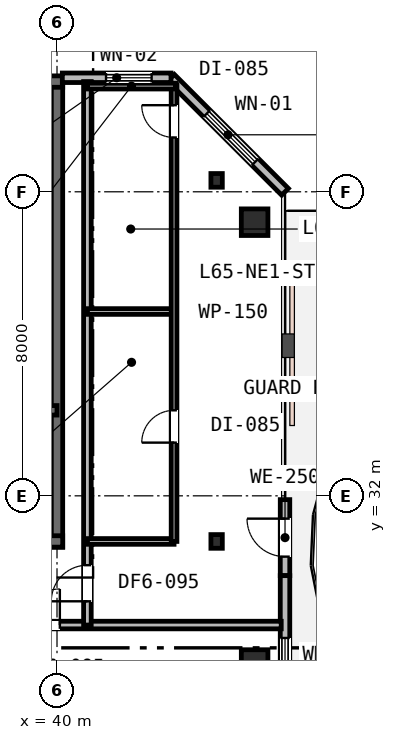
"""IFC4 building model, lengths in metres.
Left out: names, types, materials, properties, quantities, classifications, styles, units other than length and angle.
Written with IfcOpenShell. Run it as: python <this file> out.ifc"""

import sys

from ifc_helpers import new_model, si_unit, direction, frame, frame_2d, origin, origin_2d, place, context, subcontext, project, spatial, rectangle, i_section, extrude, element, fill, save


model = new_model("IFC4")
c1 = context("Model", 3, precision=1e-05, world=origin(), true_north=direction((0.0, 1.0)))
c2 = subcontext(c1, "Body", "Model", "MODEL_VIEW")
j1 = project(units=[si_unit("LENGTHUNIT", "METRE"), si_unit("PLANEANGLEUNIT", "RADIAN")], contexts=[c1])
p1 = place(None, origin())
s1 = spatial("IfcSite", under=j1, at=p1, CompositionType="ELEMENT")
p2 = place(p1, origin())
s2 = spatial("IfcBuilding", under=s1, at=p2, CompositionType="ELEMENT")
p3 = place(p2, frame((0.0, 0.0, 252.6)))
s3 = spatial("IfcBuildingStorey", under=s2, at=p3, CompositionType="ELEMENT", Elevation=252.6)
p4 = place(p3, frame((40.0, 30.65, 0.0), z_axis=(0.0, 0.0, 1.0), x_axis=(0.0, 1.0, 0.0)))
e1 = element("IfcWall", 1, at=p4, inside=s3, PredefinedType="SHEAR", context=c2, shape_type="SweptSolid", body=[
    extrude(rectangle(XDim=12.3, YDim=0.3, at=frame_2d((6.15, 0.0))), origin(), (0.0, 0.0, 1.0), 3.8),
])
p5 = place(p3, frame((15.85, 42.9, 0.0), z_axis=(0.0, 0.0, 1.0), x_axis=(1.0, 0.0, 0.0)))
e2 = element("IfcWall", 2, at=p5, inside=s3, PredefinedType="SHEAR", context=c2, shape_type="SweptSolid", body=[
    extrude(rectangle(XDim=24.3, YDim=0.3, at=frame_2d((12.15, 0.0))), origin(), (0.0, 0.0, 1.0), 3.8),
])
p6 = place(p5, frame((1.6, 0.0, 0.95)))
e3 = element("IfcOpeningElement", 3, at=p6, cuts=e2, PredefinedType="OPENING", context=c2, shape_type="SweptSolid", body=[
    extrude(rectangle(XDim=1.2, YDim=1.6, at=frame_2d((0.6, 0.8))), frame((0.0, 0.16, 0.0), z_axis=(0.0, -1.0, 0.0), x_axis=(1.0, 0.0, 0.0)), (0.0, 0.0, 1.0), 0.32),
])
p7 = place(p5, frame((16.5, 0.0, 0.95)))
e4 = element("IfcOpeningElement", 4, at=p7, cuts=e2, PredefinedType="OPENING", context=c2, shape_type="SweptSolid", body=[
    extrude(rectangle(XDim=1.2, YDim=1.6, at=frame_2d((0.6, 0.8))), frame((0.0, 0.16, 0.0), z_axis=(0.0, -1.0, 0.0), x_axis=(1.0, 0.0, 0.0)), (0.0, 0.0, 1.0), 0.32),
])
p8 = place(p5, frame((21.6, 0.0, 0.95)))
e5 = element("IfcOpeningElement", 5, at=p8, cuts=e2, PredefinedType="OPENING", context=c2, shape_type="SweptSolid", body=[
    extrude(rectangle(XDim=1.2, YDim=1.6, at=frame_2d((0.6, 0.8))), frame((0.0, 0.16, 0.0), z_axis=(0.0, -1.0, 0.0), x_axis=(1.0, 0.0, 0.0)), (0.0, 0.0, 1.0), 0.32),
])
p9 = place(p3, frame((28.95, 30.8, 0.0), z_axis=(0.0, 0.0, 1.0), x_axis=(1.0, 0.0, 0.0)))
e6 = element("IfcWall", 6, at=p9, inside=s3, PredefinedType="SHEAR", context=c2, shape_type="SweptSolid", body=[
    extrude(rectangle(XDim=11.2, YDim=0.3, at=frame_2d((5.6, 0.0))), origin(), (0.0, 0.0, 1.0), 3.8),
])
p10 = place(p9, frame((7.65, 0.0, 0.0)))
e7 = element("IfcOpeningElement", 7, at=p10, cuts=e6, PredefinedType="OPENING", context=c2, shape_type="SweptSolid", body=[
    extrude(rectangle(XDim=1.1, YDim=2.15, at=frame_2d((0.55, 1.075))), frame((0.0, 0.16, 0.0), z_axis=(0.0, -1.0, 0.0), x_axis=(1.0, 0.0, 0.0)), (0.0, 0.0, 1.0), 0.32),
])
p11 = place(p3, frame((33.95, 34.25, 0.0), z_axis=(0.0, 0.0, 1.0), x_axis=(1.0, 0.0, 0.0)))
e8 = element("IfcWall", 8, at=p11, inside=s3, PredefinedType="SHEAR", context=c2, shape_type="SweptSolid", body=[
    extrude(rectangle(XDim=6.05, YDim=0.25, at=frame_2d((3.025, 0.0))), origin(), (0.0, 0.0, 1.0), 3.8),
])
p12 = place(p11, frame((3.7, 0.0, 0.0)))
e9 = element("IfcOpeningElement", 9, at=p12, cuts=e8, PredefinedType="OPENING", context=c2, shape_type="SweptSolid", body=[
    extrude(rectangle(XDim=1.0, YDim=2.15, at=frame_2d((0.5, 1.075))), frame((0.0, 0.135, 0.0), z_axis=(0.0, -1.0, 0.0), x_axis=(1.0, 0.0, 0.0)), (0.0, 0.0, 1.0), 0.27),
])
p13 = place(p11, frame((0.55, 0.0, 0.0)))
e10 = element("IfcOpeningElement", 10, at=p13, cuts=e8, PredefinedType="OPENING", context=c2, shape_type="SweptSolid", body=[
    extrude(rectangle(XDim=1.1, YDim=2.15, at=frame_2d((0.55, 1.075))), frame((0.0, 0.135, 0.0), z_axis=(0.0, -1.0, 0.0), x_axis=(1.0, 0.0, 0.0)), (0.0, 0.0, 1.0), 0.27),
])
for number, where, z_axis, x_axis in (
    (11, (45.2, 27.6, 0.0), (0.0, 0.0, 1.0), (1.0, 0.0, 0.0)),
    (12, (45.2, 39.2, 0.0), (0.0, 0.0, 1.0), (1.0, 0.0, 0.0)),
):
    element("IfcColumn", number, at=place(p3, frame(where, z_axis=z_axis, x_axis=x_axis)), inside=s3, PredefinedType="COLUMN", context=c2, shape_type="SweptSolid", body=[
        extrude(rectangle(XDim=0.7, YDim=0.7, at=origin_2d()), origin(), (0.0, 0.0, 1.0), 3.8),
    ])
for number, where, z_axis, x_axis in (
    (13, (44.2, 30.8, 0.0), (0.0, 0.0, 1.0), (1.0, 0.0, 0.0)),
    (14, (44.2, 40.3, 0.0), (0.0, 0.0, 1.0), (1.0, 0.0, 0.0)),
):
    element("IfcColumn", number, at=place(p3, frame(where, z_axis=z_axis, x_axis=x_axis)), inside=s3, PredefinedType="COLUMN", context=c2, shape_type="SweptSolid", body=[
        extrude(i_section(OverallWidth=0.3, OverallDepth=0.36, WebThickness=0.013, FlangeThickness=0.022, FilletRadius=0.027, at=origin_2d()), origin(), (0.0, 0.0, 1.0), 3.8),
    ])
p14 = place(p3, frame((46.0, 29.9, 0.0), z_axis=(0.0, 0.0, 1.0), x_axis=(0.0, 1.0, 0.0)))
e15 = element("IfcWall", 15, at=p14, inside=s3, PredefinedType="STANDARD", context=c2, shape_type="SweptSolid", body=[
    extrude(rectangle(XDim=2.0, YDim=0.25, at=frame_2d((1.0, 0.0))), origin(), (0.0, 0.0, 1.0), 3.53),
])
p15 = place(p14, frame((0.5, 0.0, 0.0)))
e16 = element("IfcOpeningElement", 16, at=p15, cuts=e15, PredefinedType="OPENING", context=c2, shape_type="SweptSolid", body=[
    extrude(rectangle(XDim=1.0, YDim=2.15, at=frame_2d((0.5, 1.075))), frame((0.0, 0.135, 0.0), z_axis=(0.0, -1.0, 0.0), x_axis=(1.0, 0.0, 0.0)), (0.0, 0.0, 1.0), 0.27),
])
p16 = place(p3, frame((46.0, 27.0, 0.0), z_axis=(0.0, 0.0, 1.0), x_axis=(0.0, 1.0, 0.0)))
e17 = element("IfcWall", 17, at=p16, inside=s3, PredefinedType="STANDARD", context=c2, shape_type="SweptSolid", body=[
    extrude(rectangle(XDim=2.9, YDim=0.25, at=frame_2d((1.45, 0.0))), origin(), (0.0, 0.0, 1.0), 3.53),
])
p17 = place(p16, frame((0.36, 0.0, 0.9)))
e18 = element("IfcOpeningElement", 18, at=p17, cuts=e17, PredefinedType="OPENING", context=c2, shape_type="SweptSolid", body=[
    extrude(rectangle(XDim=0.9, YDim=1.55, at=frame_2d((0.45, 0.775))), frame((0.0, 0.135, 0.0), z_axis=(0.0, -1.0, 0.0), x_axis=(1.0, 0.0, 0.0)), (0.0, 0.0, 1.0), 0.27),
])
p18 = place(p3, frame((46.0, 40.0, 0.0), z_axis=(0.0, 0.0, 1.0), x_axis=(-0.707106781187, 0.707106781187, 0.0)))
e19 = element("IfcWall", 19, at=p18, inside=s3, PredefinedType="STANDARD", context=c2, shape_type="SweptSolid", body=[
    extrude(rectangle(XDim=4.243, YDim=0.25, at=frame_2d((2.121, 0.0))), origin(), (0.0, 0.0, 1.0), 3.53),
])
p19 = place(p18, frame((1.111, 0.0, 0.75)))
e20 = element("IfcOpeningElement", 20, at=p19, cuts=e19, PredefinedType="OPENING", context=c2, shape_type="SweptSolid", body=[
    extrude(rectangle(XDim=1.8, YDim=1.85, at=frame_2d((0.9, 0.925))), frame((0.0, 0.135, 0.0), z_axis=(0.0, -1.0, 0.0), x_axis=(1.0, 0.0, 0.0)), (0.0, 0.0, 1.0), 0.27),
])
p20 = place(p3, frame((43.0, 43.0, 0.0), z_axis=(0.0, 0.0, 1.0), x_axis=(-1.0, 0.0, 0.0)))
e21 = element("IfcWall", 21, at=p20, inside=s3, PredefinedType="STANDARD", context=c2, shape_type="SweptSolid", body=[
    extrude(rectangle(XDim=2.86, YDim=0.25, at=frame_2d((1.43, 0.0))), origin(), (0.0, 0.0, 1.0), 3.53),
])
p21 = place(p20, frame((0.51, 0.0, 0.85)))
e22 = element("IfcOpeningElement", 22, at=p21, cuts=e21, PredefinedType="OPENING", context=c2, shape_type="SweptSolid", body=[
    extrude(rectangle(XDim=1.2, YDim=1.6, at=frame_2d((0.6, 0.8))), frame((0.0, 0.135, 0.0), z_axis=(0.0, -1.0, 0.0), x_axis=(1.0, 0.0, 0.0)), (0.0, 0.0, 1.0), 0.27),
])
p22 = place(p3, frame((21.6, 28.6, 0.0), z_axis=(0.0, 0.0, 1.0), x_axis=(1.0, 0.0, 0.0)))
e23 = element("IfcWall", 23, at=p22, inside=s3, PredefinedType="PARTITIONING", context=c2, shape_type="SweptSolid", body=[
    extrude(rectangle(XDim=24.3, YDim=0.2, at=frame_2d((12.15, 0.0))), origin(), (0.0, 0.0, 1.0), 3.16),
])
p23 = place(p22, frame((5.925, 0.0, 0.0)))
e24 = element("IfcOpeningElement", 24, at=p23, cuts=e23, PredefinedType="OPENING", context=c2, shape_type="SweptSolid", body=[
    extrude(rectangle(XDim=0.95, YDim=2.15, at=frame_2d((0.475, 1.075))), frame((0.0, 0.11, 0.0), z_axis=(0.0, -1.0, 0.0), x_axis=(1.0, 0.0, 0.0)), (0.0, 0.0, 1.0), 0.22),
])
p24 = place(p22, frame((17.525, 0.0, 0.0)))
e25 = element("IfcOpeningElement", 25, at=p24, cuts=e23, PredefinedType="OPENING", context=c2, shape_type="SweptSolid", body=[
    extrude(rectangle(XDim=0.95, YDim=2.15, at=frame_2d((0.475, 1.075))), frame((0.0, 0.11, 0.0), z_axis=(0.0, -1.0, 0.0), x_axis=(1.0, 0.0, 0.0)), (0.0, 0.0, 1.0), 0.22),
])
p25 = place(p3, frame((40.8, 28.6, 0.0), z_axis=(0.0, 0.0, 1.0), x_axis=(0.0, 1.0, 0.0)))
e26 = element("IfcWall", 26, at=p25, inside=s3, PredefinedType="PARTITIONING", context=c2, shape_type="SweptSolid", body=[
    extrude(rectangle(XDim=14.3, YDim=0.2, at=frame_2d((7.15, 0.0))), origin(), (0.0, 0.0, 1.0), 3.16),
])
p26 = place(p25, frame((0.625, 0.0, 0.0)))
e27 = element("IfcOpeningElement", 27, at=p26, cuts=e26, PredefinedType="OPENING", context=c2, shape_type="SweptSolid", body=[
    extrude(rectangle(XDim=0.95, YDim=2.15, at=frame_2d((0.475, 1.075))), frame((0.0, 0.11, 0.0), z_axis=(0.0, -1.0, 0.0), x_axis=(1.0, 0.0, 0.0)), (0.0, 0.0, 1.0), 0.22),
])
p27 = place(p3, frame((40.8, 30.8, 0.0), z_axis=(0.0, 0.0, 1.0), x_axis=(1.0, 0.0, 0.0)))
e28 = element("IfcWall", 28, at=p27, inside=s3, PredefinedType="PARTITIONING", context=c2, shape_type="SweptSolid", body=[
    extrude(rectangle(XDim=2.28, YDim=0.15, at=frame_2d((1.14, 0.0))), origin(), (0.0, 0.0, 1.0), 3.16),
])
p28 = place(p3, frame((40.8, 36.85, 0.0), z_axis=(0.0, 0.0, 1.0), x_axis=(1.0, 0.0, 0.0)))
e29 = element("IfcWall", 29, at=p28, inside=s3, PredefinedType="PARTITIONING", context=c2, shape_type="SweptSolid", body=[
    extrude(rectangle(XDim=2.28, YDim=0.15, at=frame_2d((1.14, 0.0))), origin(), (0.0, 0.0, 1.0), 3.53),
])
p29 = place(p3, frame((43.08, 30.8, 0.0), z_axis=(0.0, 0.0, 1.0), x_axis=(0.0, 1.0, 0.0)))
e30 = element("IfcWall", 30, at=p29, inside=s3, PredefinedType="PARTITIONING", context=c2, shape_type="SweptSolid", body=[
    extrude(rectangle(XDim=12.02, YDim=0.15, at=frame_2d((6.01, 0.0))), origin(), (0.0, 0.0, 1.0), 3.16),
])
p30 = place(p29, frame((2.6, 0.0, 0.0)))
e31 = element("IfcOpeningElement", 31, at=p30, cuts=e30, PredefinedType="OPENING", context=c2, shape_type="SweptSolid", body=[
    extrude(rectangle(XDim=0.85, YDim=2.15, at=frame_2d((0.425, 1.075))), frame((0.0, 0.085, 0.0), z_axis=(0.0, -1.0, 0.0), x_axis=(1.0, 0.0, 0.0)), (0.0, 0.0, 1.0), 0.17),
])
p31 = place(p29, frame((10.629, 0.0, 0.0)))
e32 = element("IfcOpeningElement", 32, at=p31, cuts=e30, PredefinedType="OPENING", context=c2, shape_type="SweptSolid", body=[
    extrude(rectangle(XDim=0.85, YDim=2.15, at=frame_2d((0.425, 1.075))), frame((0.0, 0.085, 0.0), z_axis=(0.0, -1.0, 0.0), x_axis=(1.0, 0.0, 0.0)), (0.0, 0.0, 1.0), 0.17),
])
p32 = place(p3, frame((40.8, 42.78, 0.0), z_axis=(0.0, 0.0, 1.0), x_axis=(1.0, 0.0, 0.0)))
e33 = element("IfcWall", 33, at=p32, inside=s3, PredefinedType="PARTITIONING", context=c2, shape_type="SweptSolid", body=[
    extrude(rectangle(XDim=2.32, YDim=0.15, at=frame_2d((1.16, 0.0))), origin(), (0.0, 0.0, 1.0), 3.53),
])
p33 = place(p15, origin())
e34 = element("IfcDoor", 34, at=p33, inside=s3, OperationType="SINGLE_SWING_RIGHT", PredefinedType="DOOR", context=c2, shape_type="SweptSolid", body=[
    extrude(rectangle(XDim=1.0, YDim=2.15, at=frame_2d((0.5, 1.075))), frame((0.0, 0.025, 0.0), z_axis=(0.0, -1.0, 0.0), x_axis=(1.0, 0.0, 0.0)), (0.0, 0.0, 1.0), 0.05),
])
fill(e16, e34)
p34 = place(p17, origin())
e35 = element("IfcWindow", 35, at=p34, inside=s3, PartitioningType="SINGLE_PANEL", PredefinedType="WINDOW", context=c2, shape_type="SweptSolid", body=[
    extrude(rectangle(XDim=0.9, YDim=1.55, at=frame_2d((0.45, 0.775))), frame((0.0, 0.03, 0.0), z_axis=(0.0, -1.0, 0.0), x_axis=(1.0, 0.0, 0.0)), (0.0, 0.0, 1.0), 0.06),
])
fill(e18, e35)
p35 = place(p19, origin())
e36 = element("IfcWindow", 36, at=p35, inside=s3, PartitioningType="SINGLE_PANEL", PredefinedType="WINDOW", context=c2, shape_type="SweptSolid", body=[
    extrude(rectangle(XDim=1.8, YDim=1.85, at=frame_2d((0.9, 0.925))), frame((0.0, 0.03, 0.0), z_axis=(0.0, -1.0, 0.0), x_axis=(1.0, 0.0, 0.0)), (0.0, 0.0, 1.0), 0.06),
])
fill(e20, e36)
p36 = place(p21, origin())
e37 = element("IfcWindow", 37, at=p36, inside=s3, PartitioningType="SINGLE_PANEL", PredefinedType="WINDOW", context=c2, shape_type="SweptSolid", body=[
    extrude(rectangle(XDim=1.2, YDim=1.6, at=frame_2d((0.6, 0.8))), frame((0.0, 0.03, 0.0), z_axis=(0.0, -1.0, 0.0), x_axis=(1.0, 0.0, 0.0)), (0.0, 0.0, 1.0), 0.06),
])
fill(e22, e37)
p37 = place(p26, origin())
e38 = element("IfcDoor", 38, at=p37, inside=s3, OperationType="SINGLE_SWING_LEFT", PredefinedType="DOOR", context=c2, shape_type="SweptSolid", body=[
    extrude(rectangle(XDim=0.95, YDim=2.15, at=frame_2d((0.475, 1.075))), frame((0.0, 0.025, 0.0), z_axis=(0.0, -1.0, 0.0), x_axis=(1.0, 0.0, 0.0)), (0.0, 0.0, 1.0), 0.05),
])
fill(e27, e38)
p38 = place(p30, origin())
e39 = element("IfcDoor", 39, at=p38, inside=s3, OperationType="SINGLE_SWING_LEFT", PredefinedType="DOOR", context=c2, shape_type="SweptSolid", body=[
    extrude(rectangle(XDim=0.85, YDim=2.15, at=frame_2d((0.425, 1.075))), frame((0.0, 0.025, 0.0), z_axis=(0.0, -1.0, 0.0), x_axis=(1.0, 0.0, 0.0)), (0.0, 0.0, 1.0), 0.05),
])
fill(e31, e39)
p39 = place(p31, origin())
e40 = element("IfcDoor", 40, at=p39, inside=s3, OperationType="SINGLE_SWING_RIGHT", PredefinedType="DOOR", context=c2, shape_type="SweptSolid", body=[
    extrude(rectangle(XDim=0.85, YDim=2.15, at=frame_2d((0.425, 1.075))), frame((0.0, 0.025, 0.0), z_axis=(0.0, -1.0, 0.0), x_axis=(1.0, 0.0, 0.0)), (0.0, 0.0, 1.0), 0.05),
])
fill(e32, e40)
p40 = place(p24, origin())
e41 = element("IfcDoor", 41, at=p40, inside=s3, OperationType="SINGLE_SWING_RIGHT", PredefinedType="DOOR", context=c2, shape_type="SweptSolid", body=[
    extrude(rectangle(XDim=0.95, YDim=2.15, at=frame_2d((0.475, 1.075))), frame((0.0, 0.025, 0.0), z_axis=(0.0, -1.0, 0.0), x_axis=(1.0, 0.0, 0.0)), (0.0, 0.0, 1.0), 0.05),
])
fill(e25, e41)
save(model, sys.argv[1])
